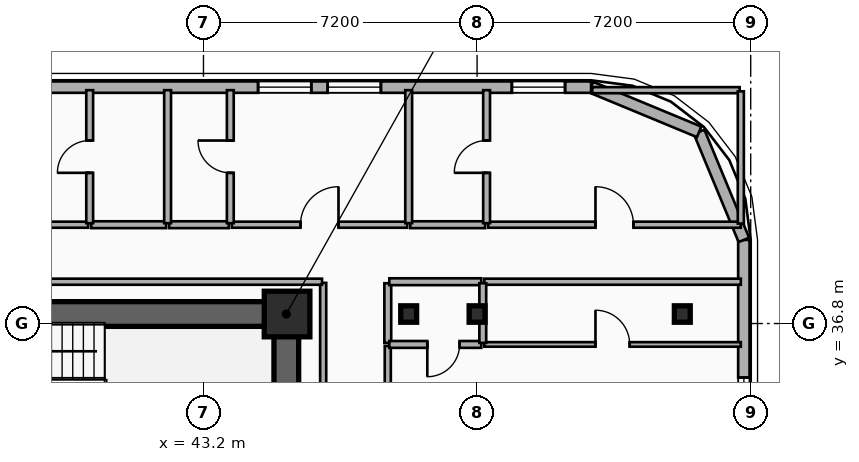
"""IFC4 building model, lengths in metres.
Left out: names, types, materials, properties, quantities, classifications, styles, units other than length and angle.
Written with IfcOpenShell. Run it as: python <this file> out.ifc"""

import sys

from ifc_helpers import new_model, si_unit, direction, frame, frame_2d, origin, origin_2d, place, context, subcontext, project, spatial, rectangle, i_section, extrude, element, fill, save


model = new_model("IFC4")
c1 = context("Model", 3, precision=1e-05, world=origin(), true_north=direction((0.0, 1.0)))
c2 = subcontext(c1, "Body", "Model", "MODEL_VIEW")
j1 = project(units=[si_unit("LENGTHUNIT", "METRE"), si_unit("PLANEANGLEUNIT", "RADIAN")], contexts=[c1])
p1 = place(None, origin())
s1 = spatial("IfcSite", under=j1, at=p1, CompositionType="ELEMENT")
p2 = place(p1, origin())
s2 = spatial("IfcBuilding", under=s1, at=p2, CompositionType="ELEMENT")
p3 = place(p2, frame((0.0, 0.0, 94.3)))
s3 = spatial("IfcBuildingStorey", under=s2, at=p3, CompositionType="ELEMENT", Elevation=94.3)
p4 = place(p3, frame((12.15, 37.05, 0.0), z_axis=(0.0, 0.0, 1.0), x_axis=(1.0, 0.0, 0.0)))
e1 = element("IfcWall", 1, at=p4, inside=s3, PredefinedType="SHEAR", context=c2, shape_type="SweptSolid", body=[
    extrude(rectangle(XDim=33.23, YDim=0.65, at=frame_2d((16.615, 0.0))), origin(), (0.0, 0.0, 1.0), 3.5),
])
p5 = place(p3, frame((45.38, 28.145, 0.0), z_axis=(0.0, 0.0, 1.0), x_axis=(0.0, 1.0, 0.0)))
e2 = element("IfcWall", 2, at=p5, inside=s3, PredefinedType="SHEAR", context=c2, shape_type="SweptSolid", body=[
    extrude(rectangle(XDim=8.58, YDim=0.65, at=frame_2d((4.29, 0.0))), origin(), (0.0, 0.0, 1.0), 3.5),
])
p6 = place(p3, frame((45.4, 37.05, 0.0), z_axis=(0.0, 0.0, 1.0), x_axis=(1.0, 0.0, 0.0)))
e3 = element("IfcColumn", 3, at=p6, inside=s3, PredefinedType="COLUMN", context=c2, shape_type="SweptSolid", body=[
    extrude(rectangle(XDim=1.2, YDim=1.2, at=origin_2d()), origin(), (0.0, 0.0, 1.0), 3.5),
])
for number, where, z_axis, x_axis in (
    (4, (48.6, 37.05, 0.0), (0.0, 0.0, 1.0), (1.0, 0.0, 0.0)),
    (5, (50.4, 37.05, 0.0), (0.0, 0.0, 1.0), (1.0, 0.0, 0.0)),
    (6, (55.8, 37.05, 0.0), (0.0, 0.0, 1.0), (1.0, 0.0, 0.0)),
):
    element("IfcColumn", number, at=place(p3, frame(where, z_axis=z_axis, x_axis=x_axis)), inside=s3, PredefinedType="COLUMN", context=c2, shape_type="SweptSolid", body=[
        extrude(i_section(OverallWidth=0.418, OverallDepth=0.432, WebThickness=0.035, FlangeThickness=0.056, FilletRadius=0.015, at=origin_2d()), origin(), (0.0, 0.0, 1.0), 3.5),
    ])
p7 = place(p3, frame((57.42, 39.0, 0.0), z_axis=(0.0, 0.0, 1.0), x_axis=(0.0, -1.0, 0.0)))
e7 = element("IfcWall", 7, at=p7, inside=s3, PredefinedType="SOLIDWALL", context=c2, shape_type="SweptSolid", body=[
    extrude(rectangle(XDim=18.0, YDim=0.3, at=frame_2d((9.0, 0.0))), origin(), (0.0, 0.0, 1.0), 3.24),
])
p8 = place(p7, frame((8.882, 0.0, 0.48)))
e8 = element("IfcOpeningElement", 8, at=p8, cuts=e7, PredefinedType="OPENING", context=c2, shape_type="SweptSolid", body=[
    extrude(rectangle(XDim=1.4, YDim=1.8, at=frame_2d((0.7, 0.9))), frame((0.0, 0.16, 0.0), z_axis=(0.0, -1.0, 0.0), x_axis=(1.0, 0.0, 0.0)), (0.0, 0.0, 1.0), 0.32),
])
p9 = place(p7, frame((3.621, 0.0, 0.48)))
e9 = element("IfcOpeningElement", 9, at=p9, cuts=e7, PredefinedType="OPENING", context=c2, shape_type="SweptSolid", body=[
    extrude(rectangle(XDim=1.4, YDim=1.8, at=frame_2d((0.7, 0.9))), frame((0.0, 0.16, 0.0), z_axis=(0.0, -1.0, 0.0), x_axis=(1.0, 0.0, 0.0)), (0.0, 0.0, 1.0), 0.32),
])
p10 = place(p7, frame((16.28, 0.0, 0.65)))
e10 = element("IfcOpeningElement", 10, at=p10, cuts=e7, PredefinedType="OPENING", context=c2, shape_type="SweptSolid", body=[
    extrude(rectangle(XDim=1.4, YDim=1.8, at=frame_2d((0.7, 0.9))), frame((0.0, 0.16, 0.0), z_axis=(0.0, -1.0, 0.0), x_axis=(1.0, 0.0, 0.0)), (0.0, 0.0, 1.0), 0.32),
])
p11 = place(p3, frame((56.243, 41.843, 0.0), z_axis=(0.0, 0.0, 1.0), x_axis=(0.382636798336, -0.92389884758, 0.0)))
e11 = element("IfcWall", 11, at=p11, inside=s3, PredefinedType="SOLIDWALL", context=c2, shape_type="SweptSolid", body=[
    extrude(rectangle(XDim=3.077, YDim=0.3, at=frame_2d((1.538, 0.0))), origin(), (0.0, 0.0, 1.0), 3.24),
])
p12 = place(p3, frame((53.4, 43.02, 0.0), z_axis=(0.0, 0.0, 1.0), x_axis=(0.923882414032, -0.382676475685, 0.0)))
e12 = element("IfcWall", 12, at=p12, inside=s3, PredefinedType="SOLIDWALL", context=c2, shape_type="SweptSolid", body=[
    extrude(rectangle(XDim=3.077, YDim=0.3, at=frame_2d((1.539, 0.0))), origin(), (0.0, 0.0, 1.0), 3.24),
])
p13 = place(p3, frame((4.2, 43.02, 0.0), z_axis=(0.0, 0.0, 1.0), x_axis=(1.0, 0.0, 0.0)))
e13 = element("IfcWall", 13, at=p13, inside=s3, PredefinedType="SOLIDWALL", context=c2, shape_type="SweptSolid", body=[
    extrude(rectangle(XDim=49.2, YDim=0.3, at=frame_2d((24.6, 0.0))), origin(), (0.0, 0.0, 1.0), 3.24),
])
p14 = place(p13, frame((4.695, 0.0, 0.85)))
e14 = element("IfcOpeningElement", 14, at=p14, cuts=e13, PredefinedType="OPENING", context=c2, shape_type="SweptSolid", body=[
    extrude(rectangle(XDim=1.4, YDim=1.8, at=frame_2d((0.7, 0.9))), frame((0.0, 0.16, 0.0), z_axis=(0.0, -1.0, 0.0), x_axis=(1.0, 0.0, 0.0)), (0.0, 0.0, 1.0), 0.32),
])
p15 = place(p13, frame((7.631, 0.0, 0.85)))
e15 = element("IfcOpeningElement", 15, at=p15, cuts=e13, PredefinedType="OPENING", context=c2, shape_type="SweptSolid", body=[
    extrude(rectangle(XDim=1.4, YDim=1.8, at=frame_2d((0.7, 0.9))), frame((0.0, 0.16, 0.0), z_axis=(0.0, -1.0, 0.0), x_axis=(1.0, 0.0, 0.0)), (0.0, 0.0, 1.0), 0.32),
])
p16 = place(p13, frame((15.417, 0.0, 0.85)))
e16 = element("IfcOpeningElement", 16, at=p16, cuts=e13, PredefinedType="OPENING", context=c2, shape_type="SweptSolid", body=[
    extrude(rectangle(XDim=1.4, YDim=1.8, at=frame_2d((0.7, 0.9))), frame((0.0, 0.16, 0.0), z_axis=(0.0, -1.0, 0.0), x_axis=(1.0, 0.0, 0.0)), (0.0, 0.0, 1.0), 0.32),
])
p17 = place(p13, frame((17.369, 0.0, 0.85)))
e17 = element("IfcOpeningElement", 17, at=p17, cuts=e13, PredefinedType="OPENING", context=c2, shape_type="SweptSolid", body=[
    extrude(rectangle(XDim=1.4, YDim=1.8, at=frame_2d((0.7, 0.9))), frame((0.0, 0.16, 0.0), z_axis=(0.0, -1.0, 0.0), x_axis=(1.0, 0.0, 0.0)), (0.0, 0.0, 1.0), 0.32),
])
p18 = place(p13, frame((22.921, 0.0, 0.85)))
e18 = element("IfcOpeningElement", 18, at=p18, cuts=e13, PredefinedType="OPENING", context=c2, shape_type="SweptSolid", body=[
    extrude(rectangle(XDim=1.4, YDim=1.8, at=frame_2d((0.7, 0.9))), frame((0.0, 0.16, 0.0), z_axis=(0.0, -1.0, 0.0), x_axis=(1.0, 0.0, 0.0)), (0.0, 0.0, 1.0), 0.32),
])
p19 = place(p13, frame((25.31, 0.0, 0.85)))
e19 = element("IfcOpeningElement", 19, at=p19, cuts=e13, PredefinedType="OPENING", context=c2, shape_type="SweptSolid", body=[
    extrude(rectangle(XDim=1.4, YDim=1.8, at=frame_2d((0.7, 0.9))), frame((0.0, 0.16, 0.0), z_axis=(0.0, -1.0, 0.0), x_axis=(1.0, 0.0, 0.0)), (0.0, 0.0, 1.0), 0.32),
])
p20 = place(p13, frame((29.835, 0.0, 0.85)))
e20 = element("IfcOpeningElement", 20, at=p20, cuts=e13, PredefinedType="OPENING", context=c2, shape_type="SweptSolid", body=[
    extrude(rectangle(XDim=1.4, YDim=1.8, at=frame_2d((0.7, 0.9))), frame((0.0, 0.16, 0.0), z_axis=(0.0, -1.0, 0.0), x_axis=(1.0, 0.0, 0.0)), (0.0, 0.0, 1.0), 0.32),
])
p21 = place(p13, frame((32.771, 0.0, 0.85)))
e21 = element("IfcOpeningElement", 21, at=p21, cuts=e13, PredefinedType="OPENING", context=c2, shape_type="SweptSolid", body=[
    extrude(rectangle(XDim=1.4, YDim=1.8, at=frame_2d((0.7, 0.9))), frame((0.0, 0.16, 0.0), z_axis=(0.0, -1.0, 0.0), x_axis=(1.0, 0.0, 0.0)), (0.0, 0.0, 1.0), 0.32),
])
p22 = place(p13, frame((40.437, 0.0, 0.85)))
e22 = element("IfcOpeningElement", 22, at=p22, cuts=e13, PredefinedType="OPENING", context=c2, shape_type="SweptSolid", body=[
    extrude(rectangle(XDim=1.4, YDim=1.8, at=frame_2d((0.7, 0.9))), frame((0.0, 0.16, 0.0), z_axis=(0.0, -1.0, 0.0), x_axis=(1.0, 0.0, 0.0)), (0.0, 0.0, 1.0), 0.32),
])
p23 = place(p13, frame((42.269, 0.0, 0.85)))
e23 = element("IfcOpeningElement", 23, at=p23, cuts=e13, PredefinedType="OPENING", context=c2, shape_type="SweptSolid", body=[
    extrude(rectangle(XDim=1.4, YDim=1.8, at=frame_2d((0.7, 0.9))), frame((0.0, 0.16, 0.0), z_axis=(0.0, -1.0, 0.0), x_axis=(1.0, 0.0, 0.0)), (0.0, 0.0, 1.0), 0.32),
])
p24 = place(p13, frame((47.115, 0.0, 0.85)))
e24 = element("IfcOpeningElement", 24, at=p24, cuts=e13, PredefinedType="OPENING", context=c2, shape_type="SweptSolid", body=[
    extrude(rectangle(XDim=1.4, YDim=1.8, at=frame_2d((0.7, 0.9))), frame((0.0, 0.16, 0.0), z_axis=(0.0, -1.0, 0.0), x_axis=(1.0, 0.0, 0.0)), (0.0, 0.0, 1.0), 0.32),
])
p25 = place(p3, frame((48.05, 33.149, 0.0), z_axis=(0.0, 0.0, 1.0), x_axis=(0.0, 1.0, 0.0)))
e25 = element("IfcWall", 25, at=p25, inside=s3, PredefinedType="PARTITIONING", context=c2, shape_type="SweptSolid", body=[
    extrude(rectangle(XDim=3.061, YDim=0.16, at=frame_2d((1.531, 0.0))), origin(), (0.0, 0.0, 1.0), 3.24),
])
p26 = place(p25, frame((1.031, 0.0, 0.0)))
e26 = element("IfcOpeningElement", 26, at=p26, cuts=e25, PredefinedType="OPENING", context=c2, shape_type="SweptSolid", body=[
    extrude(rectangle(XDim=1.0, YDim=2.15, at=frame_2d((0.5, 1.075))), frame((0.0, 0.09, 0.0), z_axis=(0.0, -1.0, 0.0), x_axis=(1.0, 0.0, 0.0)), (0.0, 0.0, 1.0), 0.18),
])
p27 = place(p3, frame((48.05, 36.29, 0.0), z_axis=(0.0, 0.0, 1.0), x_axis=(0.0, 1.0, 0.0)))
e27 = element("IfcWall", 27, at=p27, inside=s3, PredefinedType="PLUMBINGWALL", context=c2, shape_type="SweptSolid", body=[
    extrude(rectangle(XDim=1.57, YDim=0.18, at=frame_2d((0.785, 0.0))), origin(), (0.0, 0.0, 1.0), 2.72),
])
p28 = place(p3, frame((48.09, 37.9, 0.0), z_axis=(0.0, 0.0, 1.0), x_axis=(1.0, 0.0, 0.0)))
e28 = element("IfcWall", 28, at=p28, inside=s3, PredefinedType="PLUMBINGWALL", context=c2, shape_type="SweptSolid", body=[
    extrude(rectangle(XDim=2.42, YDim=0.18, at=frame_2d((1.21, 0.0))), origin(), (0.0, 0.0, 1.0), 3.24),
])
p29 = place(p3, frame((50.59, 37.9, 0.0), z_axis=(0.0, 0.0, 1.0), x_axis=(1.0, 0.0, 0.0)))
e29 = element("IfcWall", 29, at=p29, inside=s3, PredefinedType="PARTITIONING", context=c2, shape_type="SweptSolid", body=[
    extrude(rectangle(XDim=6.75, YDim=0.16, at=frame_2d((3.375, 0.0))), origin(), (0.0, 0.0, 1.0), 3.24),
])
p30 = place(p3, frame((32.24, 39.4, 0.0), z_axis=(0.0, 0.0, 1.0), x_axis=(1.0, 0.0, 0.0)))
e30 = element("IfcWall", 30, at=p30, inside=s3, PredefinedType="PARTITIONING", context=c2, shape_type="SweptSolid", body=[
    extrude(rectangle(XDim=7.926, YDim=0.16, at=frame_2d((3.963, 0.0))), origin(), (0.0, 0.0, 1.0), 3.24),
])
p31 = place(p30, frame((3.463, 0.0, 0.0)))
e31 = element("IfcOpeningElement", 31, at=p31, cuts=e30, PredefinedType="OPENING", context=c2, shape_type="SweptSolid", body=[
    extrude(rectangle(XDim=1.0, YDim=2.15, at=frame_2d((0.5, 1.075))), frame((0.0, 0.09, 0.0), z_axis=(0.0, -1.0, 0.0), x_axis=(1.0, 0.0, 0.0)), (0.0, 0.0, 1.0), 0.18),
])
p32 = place(p3, frame((40.246, 39.4, 0.0), z_axis=(0.0, 0.0, 1.0), x_axis=(1.0, 0.0, 0.0)))
e32 = element("IfcWall", 32, at=p32, inside=s3, PredefinedType="PLUMBINGWALL", context=c2, shape_type="SweptSolid", body=[
    extrude(rectangle(XDim=1.97, YDim=0.18, at=frame_2d((0.985, 0.0))), origin(), (0.0, 0.0, 1.0), 3.24),
])
p33 = place(p3, frame((43.946, 39.4, 0.0), z_axis=(0.0, 0.0, 1.0), x_axis=(1.0, 0.0, 0.0)))
e33 = element("IfcWall", 33, at=p33, inside=s3, PredefinedType="PARTITIONING", context=c2, shape_type="SweptSolid", body=[
    extrude(rectangle(XDim=4.614, YDim=0.16, at=frame_2d((2.307, 0.0))), origin(), (0.0, 0.0, 1.0), 3.24),
])
p34 = place(p33, frame((1.807, 0.0, 0.0)))
e34 = element("IfcOpeningElement", 34, at=p34, cuts=e33, PredefinedType="OPENING", context=c2, shape_type="SweptSolid", body=[
    extrude(rectangle(XDim=1.0, YDim=2.15, at=frame_2d((0.5, 1.075))), frame((0.0, 0.09, 0.0), z_axis=(0.0, -1.0, 0.0), x_axis=(1.0, 0.0, 0.0)), (0.0, 0.0, 1.0), 0.18),
])
p35 = place(p3, frame((42.296, 39.4, 0.0), z_axis=(0.0, 0.0, 1.0), x_axis=(1.0, 0.0, 0.0)))
e35 = element("IfcWall", 35, at=p35, inside=s3, PredefinedType="PLUMBINGWALL", context=c2, shape_type="SweptSolid", body=[
    extrude(rectangle(XDim=1.57, YDim=0.18, at=frame_2d((0.785, 0.0))), origin(), (0.0, 0.0, 1.0), 3.24),
])
p36 = place(p3, frame((50.69, 39.4, 0.0), z_axis=(0.0, 0.0, 1.0), x_axis=(1.0, 0.0, 0.0)))
e36 = element("IfcWall", 36, at=p36, inside=s3, PredefinedType="PARTITIONING", context=c2, shape_type="SweptSolid", body=[
    extrude(rectangle(XDim=6.65, YDim=0.16, at=frame_2d((3.325, 0.0))), origin(), (0.0, 0.0, 1.0), 3.24),
])
p37 = place(p36, frame((2.825, 0.0, 0.0)))
e37 = element("IfcOpeningElement", 37, at=p37, cuts=e36, PredefinedType="OPENING", context=c2, shape_type="SweptSolid", body=[
    extrude(rectangle(XDim=1.0, YDim=2.15, at=frame_2d((0.5, 1.075))), frame((0.0, 0.09, 0.0), z_axis=(0.0, -1.0, 0.0), x_axis=(1.0, 0.0, 0.0)), (0.0, 0.0, 1.0), 0.18),
])
p38 = place(p3, frame((48.64, 39.4, 0.0), z_axis=(0.0, 0.0, 1.0), x_axis=(1.0, 0.0, 0.0)))
e38 = element("IfcWall", 38, at=p38, inside=s3, PredefinedType="PLUMBINGWALL", context=c2, shape_type="SweptSolid", body=[
    extrude(rectangle(XDim=1.97, YDim=0.18, at=frame_2d((0.985, 0.0))), origin(), (0.0, 0.0, 1.0), 3.24),
])
p39 = place(p3, frame((50.51, 36.25, 0.0), z_axis=(0.0, 0.0, 1.0), x_axis=(-1.0, 0.0, 0.0)))
e39 = element("IfcWall", 39, at=p39, inside=s3, PredefinedType="PLUMBINGWALL", context=c2, shape_type="SweptSolid", body=[
    extrude(rectangle(XDim=2.42, YDim=0.18, at=frame_2d((1.21, 0.0))), origin(), (0.0, 0.0, 1.0), 2.57),
])
p40 = place(p39, frame((0.57, 0.0, 0.0)))
e40 = element("IfcOpeningElement", 40, at=p40, cuts=e39, PredefinedType="OPENING", context=c2, shape_type="SweptSolid", body=[
    extrude(rectangle(XDim=0.85, YDim=2.1, at=frame_2d((0.425, 1.05))), frame((0.0, 0.1, 0.0), z_axis=(0.0, -1.0, 0.0), x_axis=(1.0, 0.0, 0.0)), (0.0, 0.0, 1.0), 0.2),
])
p41 = place(p3, frame((50.59, 36.25, 0.0), z_axis=(0.0, 0.0, 1.0), x_axis=(1.0, 0.0, 0.0)))
e41 = element("IfcWall", 41, at=p41, inside=s3, PredefinedType="PARTITIONING", context=c2, shape_type="SweptSolid", body=[
    extrude(rectangle(XDim=6.75, YDim=0.12, at=frame_2d((3.375, 0.0))), origin(), (0.0, 0.0, 1.0), 2.57),
])
p42 = place(p41, frame((2.925, 0.0, 0.0)))
e42 = element("IfcOpeningElement", 42, at=p42, cuts=e41, PredefinedType="OPENING", context=c2, shape_type="SweptSolid", body=[
    extrude(rectangle(XDim=0.9, YDim=2.1, at=frame_2d((0.45, 1.05))), frame((0.0, 0.07, 0.0), z_axis=(0.0, -1.0, 0.0), x_axis=(1.0, 0.0, 0.0)), (0.0, 0.0, 1.0), 0.14),
])
p43 = place(p3, frame((50.55, 36.29, 0.0), z_axis=(0.0, 0.0, 1.0), x_axis=(0.0, 1.0, 0.0)))
e43 = element("IfcWall", 43, at=p43, inside=s3, PredefinedType="PLUMBINGWALL", context=c2, shape_type="SweptSolid", body=[
    extrude(rectangle(XDim=1.57, YDim=0.18, at=frame_2d((0.785, 0.0))), origin(), (0.0, 0.0, 1.0), 2.57),
])
p44 = place(p3, frame((40.206, 39.44, 0.0), z_axis=(0.0, 0.0, 1.0), x_axis=(0.0, 1.0, 0.0)))
e44 = element("IfcWall", 44, at=p44, inside=s3, PredefinedType="PLUMBINGWALL", context=c2, shape_type="SweptSolid", body=[
    extrude(rectangle(XDim=3.5, YDim=0.18, at=frame_2d((1.75, 0.0))), origin(), (0.0, 0.0, 1.0), 3.24),
])
p45 = place(p44, frame((1.325, 0.0, 0.0)))
e45 = element("IfcOpeningElement", 45, at=p45, cuts=e44, PredefinedType="OPENING", context=c2, shape_type="SweptSolid", body=[
    extrude(rectangle(XDim=0.85, YDim=2.1, at=frame_2d((0.425, 1.05))), frame((0.0, 0.1, 0.0), z_axis=(0.0, -1.0, 0.0), x_axis=(1.0, 0.0, 0.0)), (0.0, 0.0, 1.0), 0.2),
])
p46 = place(p3, frame((42.256, 39.44, 0.0), z_axis=(0.0, 0.0, 1.0), x_axis=(0.0, 1.0, 0.0)))
e46 = element("IfcWall", 46, at=p46, inside=s3, PredefinedType="PLUMBINGWALL", context=c2, shape_type="SweptSolid", body=[
    extrude(rectangle(XDim=3.5, YDim=0.18, at=frame_2d((1.75, 0.0))), origin(), (0.0, 0.0, 1.0), 3.24),
])
p47 = place(p3, frame((43.906, 39.44, 0.0), z_axis=(0.0, 0.0, 1.0), x_axis=(0.0, 1.0, 0.0)))
e47 = element("IfcWall", 47, at=p47, inside=s3, PredefinedType="PLUMBINGWALL", context=c2, shape_type="SweptSolid", body=[
    extrude(rectangle(XDim=3.5, YDim=0.18, at=frame_2d((1.75, 0.0))), origin(), (0.0, 0.0, 1.0), 3.24),
])
p48 = place(p47, frame((1.325, 0.0, 0.0)))
e48 = element("IfcOpeningElement", 48, at=p48, cuts=e47, PredefinedType="OPENING", context=c2, shape_type="SweptSolid", body=[
    extrude(rectangle(XDim=0.85, YDim=2.1, at=frame_2d((0.425, 1.05))), frame((0.0, 0.1, 0.0), z_axis=(0.0, -1.0, 0.0), x_axis=(1.0, 0.0, 0.0)), (0.0, 0.0, 1.0), 0.2),
])
p49 = place(p3, frame((48.6, 39.44, 0.0), z_axis=(0.0, 0.0, 1.0), x_axis=(0.0, 1.0, 0.0)))
e49 = element("IfcWall", 49, at=p49, inside=s3, PredefinedType="PLUMBINGWALL", context=c2, shape_type="SweptSolid", body=[
    extrude(rectangle(XDim=3.5, YDim=0.18, at=frame_2d((1.75, 0.0))), origin(), (0.0, 0.0, 1.0), 3.24),
])
p50 = place(p3, frame((50.65, 39.44, 0.0), z_axis=(0.0, 0.0, 1.0), x_axis=(0.0, 1.0, 0.0)))
e50 = element("IfcWall", 50, at=p50, inside=s3, PredefinedType="PLUMBINGWALL", context=c2, shape_type="SweptSolid", body=[
    extrude(rectangle(XDim=3.5, YDim=0.18, at=frame_2d((1.75, 0.0))), origin(), (0.0, 0.0, 1.0), 3.24),
])
p51 = place(p50, frame((1.325, 0.0, 0.0)))
e51 = element("IfcOpeningElement", 51, at=p51, cuts=e50, PredefinedType="OPENING", context=c2, shape_type="SweptSolid", body=[
    extrude(rectangle(XDim=0.85, YDim=2.1, at=frame_2d((0.425, 1.05))), frame((0.0, 0.1, 0.0), z_axis=(0.0, -1.0, 0.0), x_axis=(1.0, 0.0, 0.0)), (0.0, 0.0, 1.0), 0.2),
])
p52 = place(p3, frame((46.35, 27.63, 0.0), z_axis=(0.0, 0.0, 1.0), x_axis=(0.0, 1.0, 0.0)))
e52 = element("IfcWall", 52, at=p52, inside=s3, PredefinedType="PARTITIONING", context=c2, shape_type="SweptSolid", body=[
    extrude(rectangle(XDim=10.24, YDim=0.16, at=frame_2d((5.12, 0.0))), origin(), (0.0, 0.0, 1.0), 2.72),
])
p53 = place(p3, frame((11.28, 37.9, 0.0), z_axis=(0.0, 0.0, 1.0), x_axis=(1.0, 0.0, 0.0)))
e53 = element("IfcWall", 53, at=p53, inside=s3, PredefinedType="PARTITIONING", context=c2, shape_type="SweptSolid", body=[
    extrude(rectangle(XDim=35.04, YDim=0.16, at=frame_2d((17.52, 0.0))), origin(), (0.0, 0.0, 1.0), 3.24),
])
p54 = place(p3, frame((53.43, 42.94, 0.0), z_axis=(0.0, 0.0, 1.0), x_axis=(1.0, 0.0, 0.0)))
e54 = element("IfcWall", 54, at=p54, inside=s3, PredefinedType="PARTITIONING", context=c2, shape_type="SweptSolid", body=[
    extrude(rectangle(XDim=3.88, YDim=0.16, at=frame_2d((1.94, 0.0))), origin(), (0.0, 0.0, 1.0), 3.24),
])
p55 = place(p3, frame((57.34, 39.43, 0.0), z_axis=(0.0, 0.0, 1.0), x_axis=(0.0, 1.0, 0.0)))
e55 = element("IfcWall", 55, at=p55, inside=s3, PredefinedType="PARTITIONING", context=c2, shape_type="SweptSolid", body=[
    extrude(rectangle(XDim=3.48, YDim=0.16, at=frame_2d((1.74, 0.0))), origin(), (0.0, 0.0, 1.0), 3.24),
])
p56 = place(p9, origin())
e56 = element("IfcWindow", 56, at=p56, inside=s3, PartitioningType="SINGLE_PANEL", PredefinedType="WINDOW", context=c2, shape_type="SweptSolid", body=[
    extrude(rectangle(XDim=1.4, YDim=1.8, at=frame_2d((0.7, 0.9))), frame((0.0, 0.03, 0.0), z_axis=(0.0, -1.0, 0.0), x_axis=(1.0, 0.0, 0.0)), (0.0, 0.0, 1.0), 0.06),
])
fill(e9, e56)
p57 = place(p22, origin())
e57 = element("IfcWindow", 57, at=p57, inside=s3, PartitioningType="SINGLE_PANEL", PredefinedType="WINDOW", context=c2, shape_type="SweptSolid", body=[
    extrude(rectangle(XDim=1.4, YDim=1.8, at=frame_2d((0.7, 0.9))), frame((0.0, 0.03, 0.0), z_axis=(0.0, -1.0, 0.0), x_axis=(1.0, 0.0, 0.0)), (0.0, 0.0, 1.0), 0.06),
])
fill(e22, e57)
p58 = place(p23, origin())
e58 = element("IfcWindow", 58, at=p58, inside=s3, PartitioningType="SINGLE_PANEL", PredefinedType="WINDOW", context=c2, shape_type="SweptSolid", body=[
    extrude(rectangle(XDim=1.4, YDim=1.8, at=frame_2d((0.7, 0.9))), frame((0.0, 0.03, 0.0), z_axis=(0.0, -1.0, 0.0), x_axis=(1.0, 0.0, 0.0)), (0.0, 0.0, 1.0), 0.06),
])
fill(e23, e58)
p59 = place(p24, origin())
e59 = element("IfcWindow", 59, at=p59, inside=s3, PartitioningType="SINGLE_PANEL", PredefinedType="WINDOW", context=c2, shape_type="SweptSolid", body=[
    extrude(rectangle(XDim=1.4, YDim=1.8, at=frame_2d((0.7, 0.9))), frame((0.0, 0.03, 0.0), z_axis=(0.0, -1.0, 0.0), x_axis=(1.0, 0.0, 0.0)), (0.0, 0.0, 1.0), 0.06),
])
fill(e24, e59)
p60 = place(p34, origin())
e60 = element("IfcDoor", 60, at=p60, inside=s3, OperationType="SINGLE_SWING_RIGHT", PredefinedType="DOOR", context=c2, shape_type="SweptSolid", body=[
    extrude(rectangle(XDim=1.0, YDim=2.15, at=frame_2d((0.5, 1.075))), frame((0.0, 0.025, 0.0), z_axis=(0.0, -1.0, 0.0), x_axis=(1.0, 0.0, 0.0)), (0.0, 0.0, 1.0), 0.05),
])
fill(e34, e60)
p61 = place(p37, origin())
e61 = element("IfcDoor", 61, at=p61, inside=s3, OperationType="SINGLE_SWING_LEFT", PredefinedType="DOOR", context=c2, shape_type="SweptSolid", body=[
    extrude(rectangle(XDim=1.0, YDim=2.15, at=frame_2d((0.5, 1.075))), frame((0.0, 0.025, 0.0), z_axis=(0.0, -1.0, 0.0), x_axis=(1.0, 0.0, 0.0)), (0.0, 0.0, 1.0), 0.05),
])
fill(e37, e61)
p62 = place(p40, origin())
e62 = element("IfcDoor", 62, at=p62, inside=s3, OperationType="SINGLE_SWING_RIGHT", PredefinedType="DOOR", context=c2, shape_type="SweptSolid", body=[
    extrude(rectangle(XDim=0.85, YDim=2.1, at=frame_2d((0.425, 1.05))), frame((0.0, 0.025, 0.0), z_axis=(0.0, -1.0, 0.0), x_axis=(1.0, 0.0, 0.0)), (0.0, 0.0, 1.0), 0.05),
])
fill(e40, e62)
p63 = place(p42, origin())
e63 = element("IfcDoor", 63, at=p63, inside=s3, OperationType="SINGLE_SWING_LEFT", PredefinedType="DOOR", context=c2, shape_type="SweptSolid", body=[
    extrude(rectangle(XDim=0.9, YDim=2.1, at=frame_2d((0.45, 1.05))), frame((0.0, 0.025, 0.0), z_axis=(0.0, -1.0, 0.0), x_axis=(1.0, 0.0, 0.0)), (0.0, 0.0, 1.0), 0.05),
])
fill(e42, e63)
p64 = place(p45, origin())
e64 = element("IfcDoor", 64, at=p64, inside=s3, OperationType="SINGLE_SWING_LEFT", PredefinedType="DOOR", context=c2, shape_type="SweptSolid", body=[
    extrude(rectangle(XDim=0.85, YDim=2.1, at=frame_2d((0.425, 1.05))), frame((0.0, 0.025, 0.0), z_axis=(0.0, -1.0, 0.0), x_axis=(1.0, 0.0, 0.0)), (0.0, 0.0, 1.0), 0.05),
])
fill(e45, e64)
p65 = place(p48, origin())
e65 = element("IfcDoor", 65, at=p65, inside=s3, OperationType="SINGLE_SWING_RIGHT", PredefinedType="DOOR", context=c2, shape_type="SweptSolid", body=[
    extrude(rectangle(XDim=0.85, YDim=2.1, at=frame_2d((0.425, 1.05))), frame((0.0, 0.025, 0.0), z_axis=(0.0, -1.0, 0.0), x_axis=(1.0, 0.0, 0.0)), (0.0, 0.0, 1.0), 0.05),
])
fill(e48, e65)
p66 = place(p51, origin())
e66 = element("IfcDoor", 66, at=p66, inside=s3, OperationType="SINGLE_SWING_LEFT", PredefinedType="DOOR", context=c2, shape_type="SweptSolid", body=[
    extrude(rectangle(XDim=0.85, YDim=2.1, at=frame_2d((0.425, 1.05))), frame((0.0, 0.025, 0.0), z_axis=(0.0, -1.0, 0.0), x_axis=(1.0, 0.0, 0.0)), (0.0, 0.0, 1.0), 0.05),
])
fill(e51, e66)
save(model, sys.argv[1])
